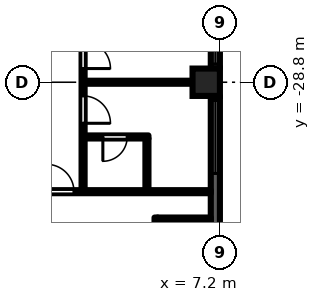
"""IFC4 building model, lengths in metres.
Left out: names, types, materials, properties, quantities, classifications, styles, units other than length and angle.
Written with IfcOpenShell. Run it as: python <this file> out.ifc"""

import sys

from ifc_helpers import new_model, si_unit, direction, frame, frame_2d, origin, origin_2d, place, context, subcontext, project, spatial, rectangle, extrude, element, fill, save


model = new_model("IFC4")
c1 = context("Model", 3, precision=1e-05, world=origin(), true_north=direction((0.0, 1.0)))
c2 = subcontext(c1, "Body", "Model", "MODEL_VIEW")
j1 = project(units=[si_unit("LENGTHUNIT", "METRE"), si_unit("PLANEANGLEUNIT", "RADIAN")], contexts=[c1])
p1 = place(None, origin())
s1 = spatial("IfcSite", under=j1, at=p1, CompositionType="ELEMENT")
p2 = place(p1, origin())
s2 = spatial("IfcBuilding", under=s1, at=p2, CompositionType="ELEMENT")
p3 = place(p2, frame((0.0, 0.0, 20.7)))
s3 = spatial("IfcBuildingStorey", under=s2, at=p3, CompositionType="ELEMENT", Elevation=20.7)
p4 = place(p3, frame((6.75, -28.8, 0.0), z_axis=(0.0, 0.0, 1.0), x_axis=(1.0, 0.0, 0.0)))
e1 = element("IfcColumn", 1, at=p4, inside=s3, PredefinedType="COLUMN", context=c2, shape_type="SweptSolid", body=[
    extrude(rectangle(XDim=0.9, YDim=0.9, at=origin_2d()), origin(), (0.0, 0.0, 1.0), 3.0),
])
p5 = place(p3, frame((7.05, -35.55, 0.0), z_axis=(0.0, 0.0, 1.0), x_axis=(0.0, 1.0, 0.0)))
e2 = element("IfcWall", 2, at=p5, inside=s3, PredefinedType="SOLIDWALL", context=c2, shape_type="SweptSolid", body=[
    extrude(rectangle(XDim=6.3, YDim=0.3, at=frame_2d((3.15, 0.0))), origin(), (0.0, 0.0, 1.0), 2.1),
])
p6 = place(p5, frame((3.75, 0.0, 0.2)))
e3 = element("IfcOpeningElement", 3, at=p6, cuts=e2, PredefinedType="OPENING", context=c2, shape_type="SweptSolid", body=[
    extrude(rectangle(XDim=2.4, YDim=1.85, at=frame_2d((1.2, 0.925))), frame((0.0, 0.16, 0.0), z_axis=(0.0, -1.0, 0.0), x_axis=(1.0, 0.0, 0.0)), (0.0, 0.0, 1.0), 0.32),
])
p7 = place(p3, frame((7.05, -28.35, 0.0), z_axis=(0.0, 0.0, 1.0), x_axis=(0.0, 1.0, 0.0)))
e4 = element("IfcWall", 4, at=p7, inside=s3, PredefinedType="SOLIDWALL", context=c2, shape_type="SweptSolid", body=[
    extrude(rectangle(XDim=6.3, YDim=0.3, at=frame_2d((3.15, 0.0))), origin(), (0.0, 0.0, 1.0), 2.1),
])
p8 = place(p7, frame((0.15, 0.0, 0.2)))
e5 = element("IfcOpeningElement", 5, at=p8, cuts=e4, PredefinedType="OPENING", context=c2, shape_type="SweptSolid", body=[
    extrude(rectangle(XDim=2.4, YDim=1.85, at=frame_2d((1.2, 0.925))), frame((0.0, 0.16, 0.0), z_axis=(0.0, -1.0, 0.0), x_axis=(1.0, 0.0, 0.0)), (0.0, 0.0, 1.0), 0.32),
])
p9 = place(p7, frame((3.75, 0.0, 0.2)))
e6 = element("IfcOpeningElement", 6, at=p9, cuts=e4, PredefinedType="OPENING", context=c2, shape_type="SweptSolid", body=[
    extrude(rectangle(XDim=2.4, YDim=1.85, at=frame_2d((1.2, 0.925))), frame((0.0, 0.16, 0.0), z_axis=(0.0, -1.0, 0.0), x_axis=(1.0, 0.0, 0.0)), (0.0, 0.0, 1.0), 0.32),
])
p10 = place(p3, frame((1.275, -32.4, 0.0), z_axis=(0.0, 0.0, 1.0), x_axis=(1.0, 0.0, 0.0)))
e7 = element("IfcWall", 7, at=p10, inside=s3, PredefinedType="PARTITIONING", context=c2, shape_type="SweptSolid", body=[
    extrude(rectangle(XDim=5.625, YDim=0.1, at=frame_2d((2.812, 0.0))), origin(), (0.0, 0.0, 1.0), 2.575),
])
p11 = place(p10, frame((0.225, 0.0, 0.0)))
e8 = element("IfcOpeningElement", 8, at=p11, cuts=e7, PredefinedType="OPENING", context=c2, shape_type="SweptSolid", body=[
    extrude(rectangle(XDim=0.9, YDim=2.1, at=frame_2d((0.45, 1.05))), frame((0.0, 0.06, 0.0), z_axis=(0.0, -1.0, 0.0), x_axis=(1.0, 0.0, 0.0)), (0.0, 0.0, 1.0), 0.12),
])
p12 = place(p3, frame((2.7, -32.35, 0.0), z_axis=(0.0, 0.0, 1.0), x_axis=(0.0, 1.0, 0.0)))
e9 = element("IfcWall", 9, at=p12, inside=s3, PredefinedType="PARTITIONING", context=c2, shape_type="SweptSolid", body=[
    extrude(rectangle(XDim=17.888, YDim=0.1, at=frame_2d((8.944, 0.0))), origin(), (0.0, 0.0, 1.0), 2.575),
])
p13 = place(p12, frame((2.2, 0.0, 0.0)))
e10 = element("IfcOpeningElement", 10, at=p13, cuts=e9, PredefinedType="OPENING", context=c2, shape_type="SweptSolid", body=[
    extrude(rectangle(XDim=0.9, YDim=2.1, at=frame_2d((0.45, 1.05))), frame((0.0, 0.06, 0.0), z_axis=(0.0, -1.0, 0.0), x_axis=(1.0, 0.0, 0.0)), (0.0, 0.0, 1.0), 0.12),
])
p14 = place(p12, frame((4.0, 0.0, 0.0)))
e11 = element("IfcOpeningElement", 11, at=p14, cuts=e9, PredefinedType="OPENING", context=c2, shape_type="SweptSolid", body=[
    extrude(rectangle(XDim=0.9, YDim=2.1, at=frame_2d((0.45, 1.05))), frame((0.0, 0.06, 0.0), z_axis=(0.0, -1.0, 0.0), x_axis=(1.0, 0.0, 0.0)), (0.0, 0.0, 1.0), 0.12),
])
p15 = place(p12, frame((9.4, 0.0, 0.0)))
e12 = element("IfcOpeningElement", 12, at=p15, cuts=e9, PredefinedType="OPENING", context=c2, shape_type="SweptSolid", body=[
    extrude(rectangle(XDim=0.9, YDim=2.1, at=frame_2d((0.45, 1.05))), frame((0.0, 0.06, 0.0), z_axis=(0.0, -1.0, 0.0), x_axis=(1.0, 0.0, 0.0)), (0.0, 0.0, 1.0), 0.12),
])
p16 = place(p12, frame((11.2, 0.0, 0.0)))
e13 = element("IfcOpeningElement", 13, at=p16, cuts=e9, PredefinedType="OPENING", context=c2, shape_type="SweptSolid", body=[
    extrude(rectangle(XDim=0.9, YDim=2.1, at=frame_2d((0.45, 1.05))), frame((0.0, 0.06, 0.0), z_axis=(0.0, -1.0, 0.0), x_axis=(1.0, 0.0, 0.0)), (0.0, 0.0, 1.0), 0.12),
])
p17 = place(p12, frame((14.8, 0.0, 0.0)))
e14 = element("IfcOpeningElement", 14, at=p17, cuts=e9, PredefinedType="OPENING", context=c2, shape_type="SweptSolid", body=[
    extrude(rectangle(XDim=0.9, YDim=2.1, at=frame_2d((0.45, 1.05))), frame((0.0, 0.06, 0.0), z_axis=(0.0, -1.0, 0.0), x_axis=(1.0, 0.0, 0.0)), (0.0, 0.0, 1.0), 0.12),
])
p18 = place(p3, frame((2.75, -30.6, 0.0), z_axis=(0.0, 0.0, 1.0), x_axis=(1.0, 0.0, 0.0)))
e15 = element("IfcWall", 15, at=p18, inside=s3, PredefinedType="PARTITIONING", context=c2, shape_type="SweptSolid", body=[
    extrude(rectangle(XDim=2.1, YDim=0.1, at=frame_2d((1.05, 0.0))), origin(), (0.0, 0.0, 1.0), 2.575),
])
p19 = place(p18, frame((0.6, 0.0, 0.0)))
e16 = element("IfcOpeningElement", 16, at=p19, cuts=e15, PredefinedType="OPENING", context=c2, shape_type="SweptSolid", body=[
    extrude(rectangle(XDim=0.8, YDim=2.1, at=frame_2d((0.4, 1.05))), frame((0.0, 0.06, 0.0), z_axis=(0.0, -1.0, 0.0), x_axis=(1.0, 0.0, 0.0)), (0.0, 0.0, 1.0), 0.12),
])
p20 = place(p3, frame((2.75, -28.8, 0.0), z_axis=(0.0, 0.0, 1.0), x_axis=(1.0, 0.0, 0.0)))
e17 = element("IfcWall", 17, at=p20, inside=s3, PredefinedType="PARTITIONING", context=c2, shape_type="SweptSolid", body=[
    extrude(rectangle(XDim=4.15, YDim=0.1, at=frame_2d((2.075, 0.0))), origin(), (0.0, 0.0, 1.0), 2.575),
])
p21 = place(p3, frame((4.8, -32.35, 0.0), z_axis=(0.0, 0.0, 1.0), x_axis=(0.0, 1.0, 0.0)))
e18 = element("IfcWall", 18, at=p21, inside=s3, PredefinedType="PARTITIONING", context=c2, shape_type="SweptSolid", body=[
    extrude(rectangle(XDim=1.7, YDim=0.1, at=frame_2d((0.85, 0.0))), origin(), (0.0, 0.0, 1.0), 2.575),
])
p22 = place(p3, frame((5.1, -35.15, 0.0), z_axis=(0.0, 0.0, 1.0), x_axis=(0.0, 1.0, 0.0)))
e19 = element("IfcWall", 19, at=p22, inside=s3, PredefinedType="PARTITIONING", context=c2, shape_type="SweptSolid", body=[
    extrude(rectangle(XDim=1.9, YDim=0.1, at=frame_2d((0.95, 0.0))), origin(), (0.0, 0.0, 1.0), 2.575),
])
p23 = place(p22, frame((0.55, 0.0, 0.0)))
e20 = element("IfcOpeningElement", 20, at=p23, cuts=e19, PredefinedType="OPENING", context=c2, shape_type="SweptSolid", body=[
    extrude(rectangle(XDim=0.8, YDim=2.1, at=frame_2d((0.4, 1.05))), frame((0.0, 0.06, 0.0), z_axis=(0.0, -1.0, 0.0), x_axis=(1.0, 0.0, 0.0)), (0.0, 0.0, 1.0), 0.12),
])
p24 = place(p3, frame((5.15, -33.3, 0.0), z_axis=(0.0, 0.0, 1.0), x_axis=(1.0, 0.0, 0.0)))
e21 = element("IfcWall", 21, at=p24, inside=s3, PredefinedType="PARTITIONING", context=c2, shape_type="SweptSolid", body=[
    extrude(rectangle(XDim=1.75, YDim=0.1, at=frame_2d((0.875, 0.0))), origin(), (0.0, 0.0, 1.0), 2.575),
])
p25 = place(p6, origin())
e22 = element("IfcWindow", 22, at=p25, inside=s3, PartitioningType="SINGLE_PANEL", PredefinedType="WINDOW", context=c2, shape_type="SweptSolid", body=[
    extrude(rectangle(XDim=2.4, YDim=1.85, at=frame_2d((1.2, 0.925))), frame((0.0, 0.03, 0.0), z_axis=(0.0, -1.0, 0.0), x_axis=(1.0, 0.0, 0.0)), (0.0, 0.0, 1.0), 0.06),
])
fill(e3, e22)
p26 = place(p8, origin())
e23 = element("IfcWindow", 23, at=p26, inside=s3, PartitioningType="SINGLE_PANEL", PredefinedType="WINDOW", context=c2, shape_type="SweptSolid", body=[
    extrude(rectangle(XDim=2.4, YDim=1.85, at=frame_2d((1.2, 0.925))), frame((0.0, 0.03, 0.0), z_axis=(0.0, -1.0, 0.0), x_axis=(1.0, 0.0, 0.0)), (0.0, 0.0, 1.0), 0.06),
])
fill(e5, e23)
p27 = place(p11, origin())
e24 = element("IfcDoor", 24, at=p27, inside=s3, OperationType="SINGLE_SWING_LEFT", PredefinedType="DOOR", context=c2, shape_type="SweptSolid", body=[
    extrude(rectangle(XDim=0.9, YDim=2.1, at=frame_2d((0.45, 1.05))), frame((0.0, 0.025, 0.0), z_axis=(0.0, -1.0, 0.0), x_axis=(1.0, 0.0, 0.0)), (0.0, 0.0, 1.0), 0.05),
])
fill(e8, e24)
p28 = place(p13, frame((0.9, 0.0, 0.0), z_axis=(0.0, 0.0, 1.0), x_axis=(-1.0, 0.0, 0.0)))
e25 = element("IfcDoor", 25, at=p28, inside=s3, OperationType="SINGLE_SWING_RIGHT", PredefinedType="DOOR", context=c2, shape_type="SweptSolid", body=[
    extrude(rectangle(XDim=0.9, YDim=2.1, at=frame_2d((0.45, 1.05))), frame((0.0, 0.025, 0.0), z_axis=(0.0, -1.0, 0.0), x_axis=(1.0, 0.0, 0.0)), (0.0, 0.0, 1.0), 0.05),
])
fill(e10, e25)
p29 = place(p14, frame((0.9, 0.0, 0.0), z_axis=(0.0, 0.0, 1.0), x_axis=(-1.0, 0.0, 0.0)))
e26 = element("IfcDoor", 26, at=p29, inside=s3, OperationType="SINGLE_SWING_RIGHT", PredefinedType="DOOR", context=c2, shape_type="SweptSolid", body=[
    extrude(rectangle(XDim=0.9, YDim=2.1, at=frame_2d((0.45, 1.05))), frame((0.0, 0.025, 0.0), z_axis=(0.0, -1.0, 0.0), x_axis=(1.0, 0.0, 0.0)), (0.0, 0.0, 1.0), 0.05),
])
fill(e11, e26)
p30 = place(p19, frame((0.8, 0.0, 0.0), z_axis=(0.0, 0.0, 1.0), x_axis=(-1.0, 0.0, 0.0)))
e27 = element("IfcDoor", 27, at=p30, inside=s3, OperationType="SINGLE_SWING_RIGHT", PredefinedType="DOOR", context=c2, shape_type="SweptSolid", body=[
    extrude(rectangle(XDim=0.8, YDim=2.1, at=frame_2d((0.4, 1.05))), frame((0.0, 0.025, 0.0), z_axis=(0.0, -1.0, 0.0), x_axis=(1.0, 0.0, 0.0)), (0.0, 0.0, 1.0), 0.05),
])
fill(e16, e27)
save(model, sys.argv[1])
